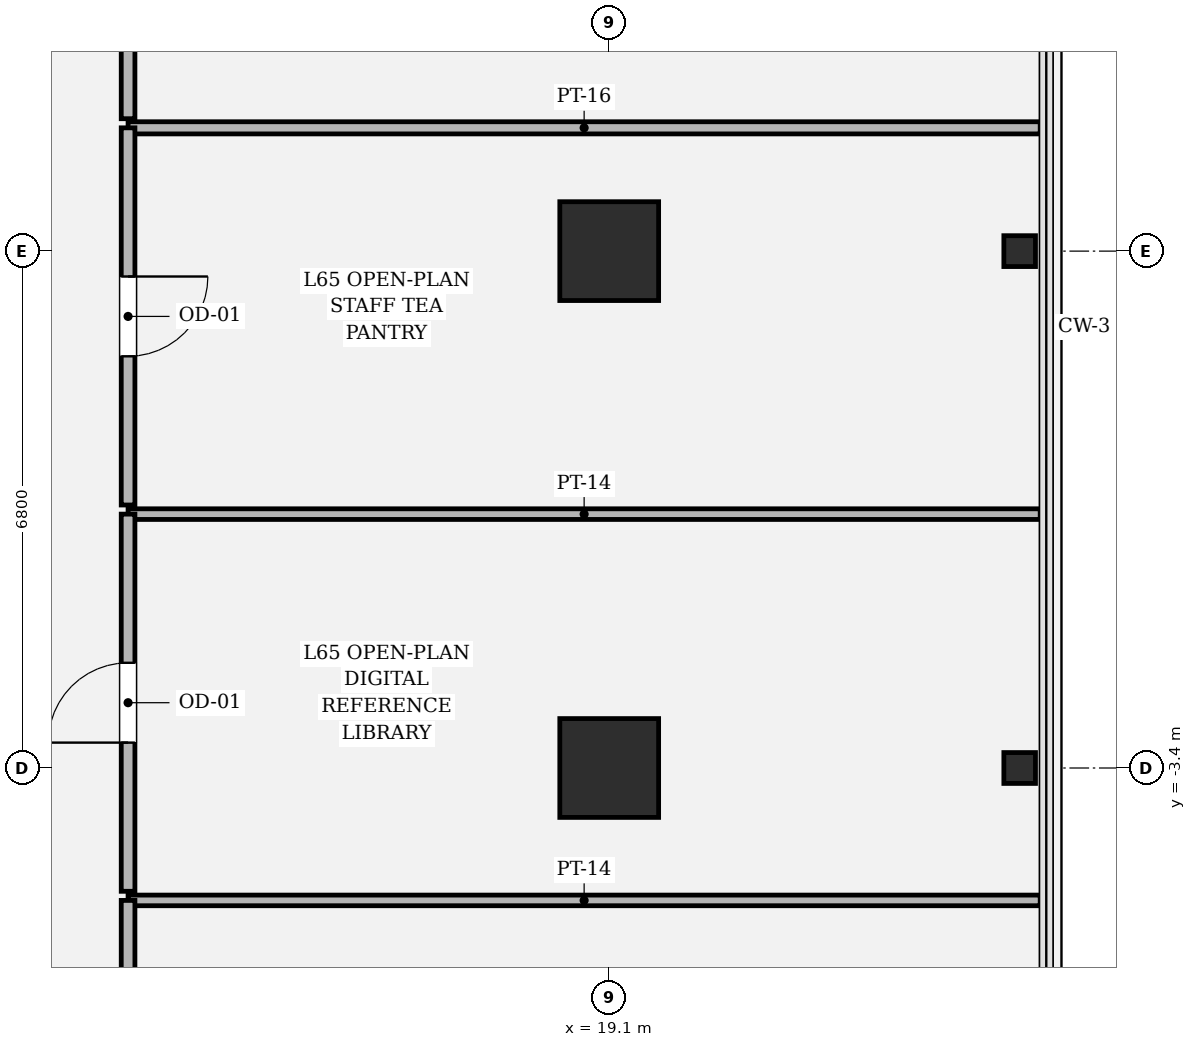
"""IFC4 building model, lengths in metres.
Left out: names, types, materials, properties, quantities, classifications, styles, units other than length and angle.
Written with IfcOpenShell. Run it as: python <this file> out.ifc"""

import sys

from ifc_helpers import new_model, si_unit, direction, frame, frame_2d, origin, origin_2d, place, context, subcontext, project, spatial, rectangle, hollow_rectangle, i_section, extrude, element, fill, save


model = new_model("IFC4")
c1 = context("Model", 3, precision=1e-05, world=origin(), true_north=direction((0.0, 1.0)))
c2 = subcontext(c1, "Body", "Model", "MODEL_VIEW")
j1 = project(units=[si_unit("LENGTHUNIT", "METRE"), si_unit("PLANEANGLEUNIT", "RADIAN")], contexts=[c1])
p1 = place(None, origin())
s1 = spatial("IfcSite", under=j1, at=p1, CompositionType="ELEMENT")
p2 = place(p1, origin())
s2 = spatial("IfcBuilding", under=s1, at=p2, CompositionType="ELEMENT")
p3 = place(p2, frame((0.0, 0.0, 275.7)))
s3 = spatial("IfcBuildingStorey", under=s2, at=p3, CompositionType="ELEMENT", Elevation=275.7)
for number, where, z_axis, x_axis in (
    (1, (19.1, -3.4, 0.0), (0.0, 0.0, 1.0), (1.0, 0.0, 0.0)),
    (2, (19.1, 3.4, 0.0), (0.0, 0.0, 1.0), (1.0, 0.0, 0.0)),
):
    element("IfcColumn", number, at=place(p3, frame(where, z_axis=z_axis, x_axis=x_axis)), inside=s3, PredefinedType="COLUMN", context=c2, shape_type="SweptSolid", body=[
        extrude(hollow_rectangle(XDim=1.3, YDim=1.3, WallThickness=0.038, at=origin_2d()), origin(), (0.0, 0.0, 1.0), 4.05),
    ])
for number, where, z_axis, x_axis in (
    (3, (24.5, -3.4, 0.0), (0.0, 0.0, 1.0), (0.0, 1.0, 0.0)),
    (4, (24.5, 3.4, 0.0), (0.0, 0.0, 1.0), (0.0, 1.0, 0.0)),
):
    element("IfcColumn", number, at=place(p3, frame(where, z_axis=z_axis, x_axis=x_axis)), inside=s3, PredefinedType="COLUMN", context=c2, shape_type="SweptSolid", body=[
        extrude(i_section(OverallWidth=0.406, OverallDepth=0.416, WebThickness=0.029, FlangeThickness=0.048, FilletRadius=0.018, at=origin_2d()), origin(), (0.0, 0.0, 1.0), 4.048),
    ])
p4 = place(p3, frame((12.77, -5.142, 0.0), z_axis=(0.0, 0.0, 1.0), x_axis=(1.0, 0.0, 0.0)))
e5 = element("IfcWall", 5, at=p4, inside=s3, PredefinedType="PARTITIONING", context=c2, shape_type="SweptSolid", body=[
    extrude(rectangle(XDim=12.0, YDim=0.14, at=frame_2d((6.0, 0.0))), origin(), (0.0, 0.0, 1.0), 2.564),
])
p5 = place(p3, frame((12.77, -11.49, 0.0), z_axis=(0.0, 0.0, 1.0), x_axis=(0.0, 1.0, 0.0)))
e6 = element("IfcWall", 6, at=p5, inside=s3, PredefinedType="PARTITIONING", context=c2, shape_type="SweptSolid", body=[
    extrude(rectangle(XDim=6.348, YDim=0.18, at=frame_2d((3.174, 0.0))), origin(), (0.0, 0.0, 1.0), 3.244),
])
p6 = place(p5, frame((2.649, 0.0, 0.0)))
e7 = element("IfcOpeningElement", 7, at=p6, cuts=e6, PredefinedType="OPENING", context=c2, shape_type="SweptSolid", body=[
    extrude(rectangle(XDim=1.05, YDim=2.2, at=frame_2d((0.525, 1.1))), frame((0.0, 0.1, 0.0), z_axis=(0.0, -1.0, 0.0), x_axis=(1.0, 0.0, 0.0)), (0.0, 0.0, 1.0), 0.2),
])
p7 = place(p3, frame((12.77, -0.06, 0.0), z_axis=(0.0, 0.0, 1.0), x_axis=(1.0, 0.0, 0.0)))
e8 = element("IfcWall", 8, at=p7, inside=s3, PredefinedType="PARTITIONING", context=c2, shape_type="SweptSolid", body=[
    extrude(rectangle(XDim=12.0, YDim=0.14, at=frame_2d((6.0, 0.0))), origin(), (0.0, 0.0, 1.0), 2.564),
])
p8 = place(p3, frame((12.77, -5.022, 0.0), z_axis=(0.0, 0.0, 1.0), x_axis=(0.0, 1.0, 0.0)))
e9 = element("IfcWall", 9, at=p8, inside=s3, PredefinedType="PARTITIONING", context=c2, shape_type="SweptSolid", body=[
    extrude(rectangle(XDim=4.962, YDim=0.18, at=frame_2d((2.481, 0.0))), origin(), (0.0, 0.0, 1.0), 3.244),
])
p9 = place(p8, frame((1.956, 0.0, 0.0)))
e10 = element("IfcOpeningElement", 10, at=p9, cuts=e9, PredefinedType="OPENING", context=c2, shape_type="SweptSolid", body=[
    extrude(rectangle(XDim=1.05, YDim=2.2, at=frame_2d((0.525, 1.1))), frame((0.0, 0.1, 0.0), z_axis=(0.0, -1.0, 0.0), x_axis=(1.0, 0.0, 0.0)), (0.0, 0.0, 1.0), 0.2),
])
p10 = place(p3, frame((12.77, 5.022, 0.0), z_axis=(0.0, 0.0, 1.0), x_axis=(1.0, 0.0, 0.0)))
e11 = element("IfcWall", 11, at=p10, inside=s3, PredefinedType="PARTITIONING", context=c2, shape_type="SweptSolid", body=[
    extrude(rectangle(XDim=12.0, YDim=0.16, at=frame_2d((6.0, 0.0))), origin(), (0.0, 0.0, 1.0), 2.564),
])
p11 = place(p3, frame((12.77, 0.06, 0.0), z_axis=(0.0, 0.0, 1.0), x_axis=(0.0, 1.0, 0.0)))
e12 = element("IfcWall", 12, at=p11, inside=s3, PredefinedType="PARTITIONING", context=c2, shape_type="SweptSolid", body=[
    extrude(rectangle(XDim=4.962, YDim=0.18, at=frame_2d((2.481, 0.0))), origin(), (0.0, 0.0, 1.0), 3.244),
])
p12 = place(p11, frame((1.956, 0.0, 0.0)))
e13 = element("IfcOpeningElement", 13, at=p12, cuts=e12, PredefinedType="OPENING", context=c2, shape_type="SweptSolid", body=[
    extrude(rectangle(XDim=1.05, YDim=2.2, at=frame_2d((0.525, 1.1))), frame((0.0, 0.1, 0.0), z_axis=(0.0, -1.0, 0.0), x_axis=(1.0, 0.0, 0.0)), (0.0, 0.0, 1.0), 0.2),
])
p13 = place(p3, frame((12.77, 5.142, 0.0), z_axis=(0.0, 0.0, 1.0), x_axis=(0.0, 1.0, 0.0)))
e14 = element("IfcWall", 14, at=p13, inside=s3, PredefinedType="PARTITIONING", context=c2, shape_type="SweptSolid", body=[
    extrude(rectangle(XDim=6.348, YDim=0.18, at=frame_2d((3.174, 0.0))), origin(), (0.0, 0.0, 1.0), 3.244),
])
p14 = place(p13, frame((2.649, 0.0, 0.0)))
e15 = element("IfcOpeningElement", 15, at=p14, cuts=e14, PredefinedType="OPENING", context=c2, shape_type="SweptSolid", body=[
    extrude(rectangle(XDim=1.05, YDim=2.2, at=frame_2d((0.525, 1.1))), frame((0.0, 0.1, 0.0), z_axis=(0.0, -1.0, 0.0), x_axis=(1.0, 0.0, 0.0)), (0.0, 0.0, 1.0), 0.2),
])
p15 = place(p9, origin())
e16 = element("IfcDoor", 16, at=p15, inside=s3, OperationType="SINGLE_SWING_LEFT", PredefinedType="DOOR", context=c2, shape_type="SweptSolid", body=[
    extrude(rectangle(XDim=1.05, YDim=2.2, at=frame_2d((0.525, 1.1))), frame((0.0, 0.025, 0.0), z_axis=(0.0, -1.0, 0.0), x_axis=(1.0, 0.0, 0.0)), (0.0, 0.0, 1.0), 0.05),
])
fill(e10, e16)
p16 = place(p12, origin())
e17 = element("IfcDoor", 17, at=p16, inside=s3, OperationType="SINGLE_SWING_RIGHT", PredefinedType="DOOR", context=c2, shape_type="SweptSolid", body=[
    extrude(rectangle(XDim=1.05, YDim=2.2, at=frame_2d((0.525, 1.1))), frame((0.0, 0.025, 0.0), z_axis=(0.0, -1.0, 0.0), x_axis=(1.0, 0.0, 0.0)), (0.0, 0.0, 1.0), 0.05),
])
fill(e13, e17)
save(model, sys.argv[1])
